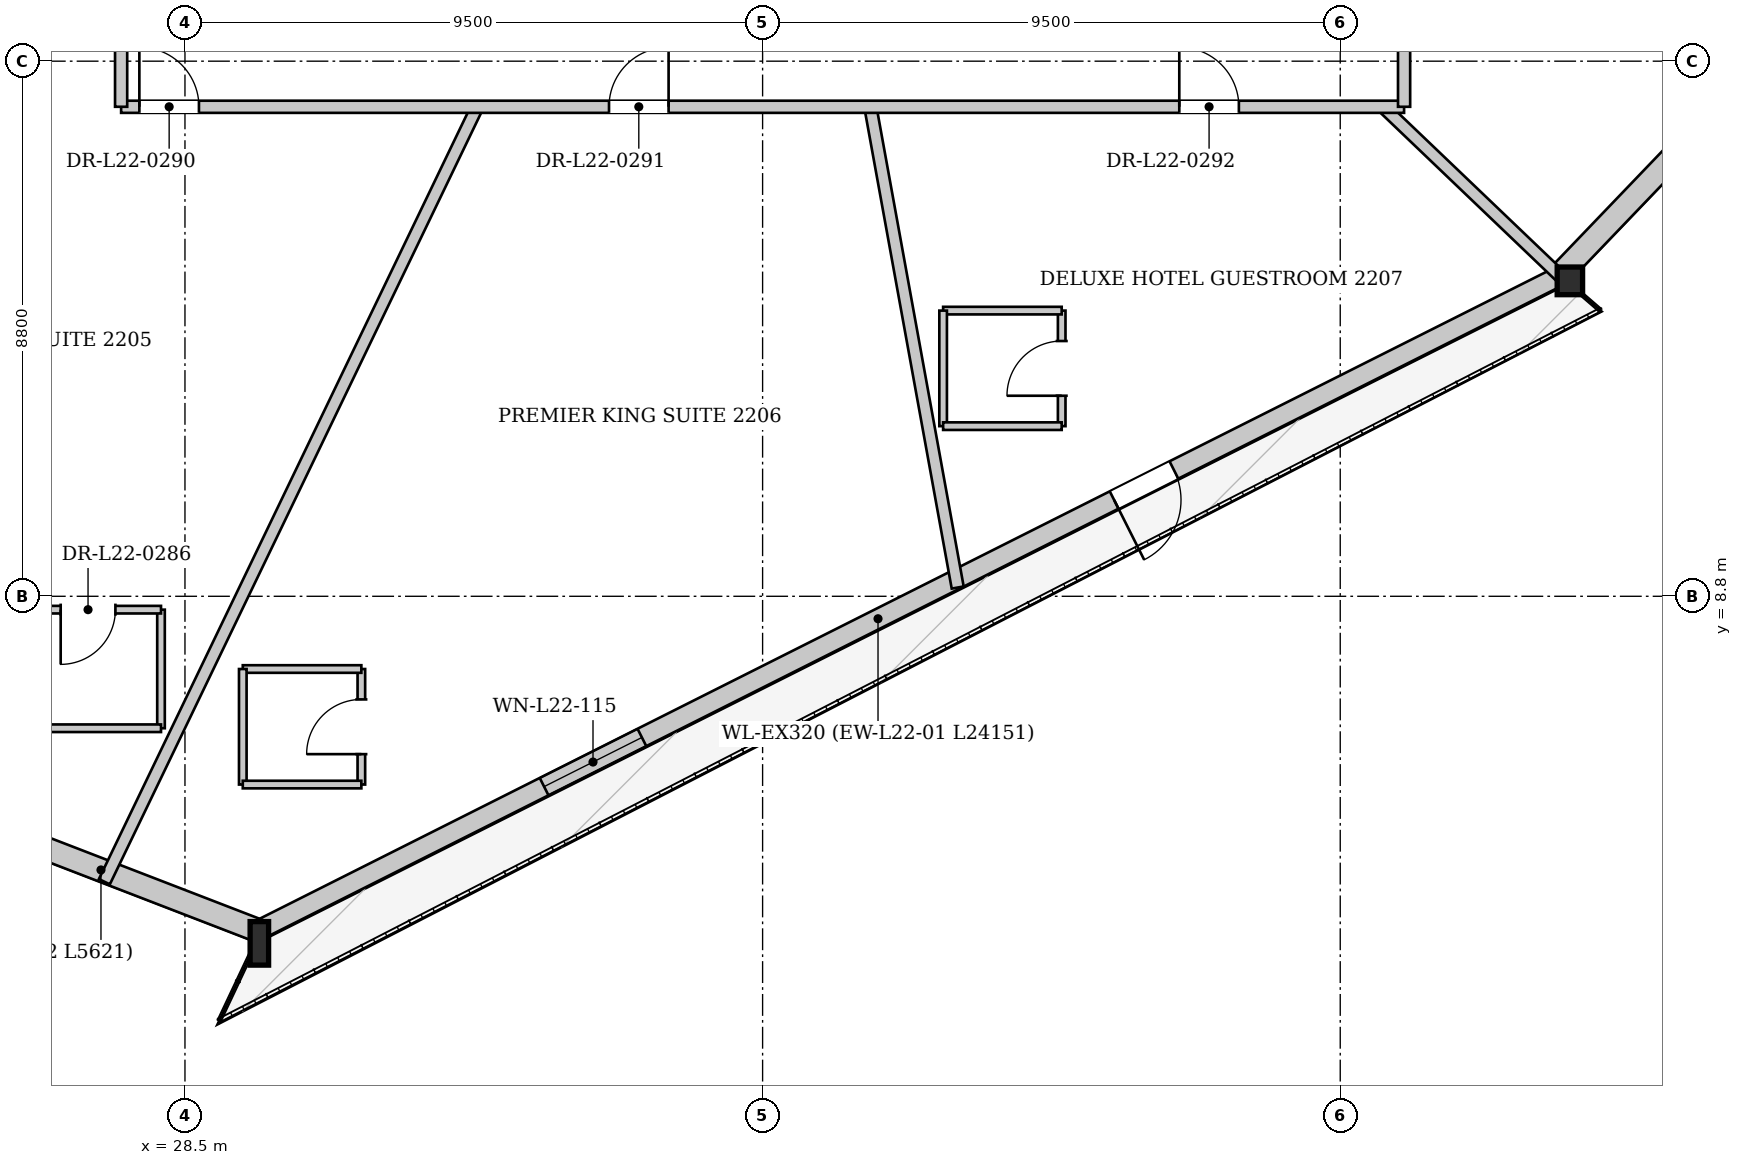
"""IFC4 building model, lengths in metres.
Left out: names, types, materials, properties, quantities, classifications, styles, units other than length and angle.
Written with IfcOpenShell. Run it as: python <this file> out.ifc"""

import sys

from ifc_helpers import new_model, si_unit, direction, frame, frame_2d, origin, origin_2d, place, context, subcontext, project, spatial, rectangle, i_section, extrude, source, transform, mapped, element, fill, save


model = new_model("IFC4")
c1 = context("Model", 3, precision=1e-05, world=origin(), true_north=direction((0.0, 1.0)))
c2 = subcontext(c1, "Body", "Model", "MODEL_VIEW")
j1 = project(units=[si_unit("LENGTHUNIT", "METRE"), si_unit("PLANEANGLEUNIT", "RADIAN")], contexts=[c1])
p1 = place(None, origin())
s1 = spatial("IfcSite", under=j1, at=p1, CompositionType="ELEMENT")
p2 = place(p1, origin())
s2 = spatial("IfcBuilding", under=s1, at=p2, CompositionType="ELEMENT")
p3 = place(p2, frame((0.0, 0.0, 87.95)))
s3 = spatial("IfcBuildingStorey", under=s2, at=p3, CompositionType="ELEMENT", Elevation=87.95)
m1 = source(origin(), c2, "Body", "SweptSolid", [
    extrude(i_section(OverallWidth=0.304, OverallDepth=0.716, WebThickness=0.021, FlangeThickness=0.04, at=origin_2d()), origin(), (0.0, 0.0, 1.0), 3.387),
])
p4 = place(p3, frame((29.672, 3.111, 0.0), z_axis=(0.030348511099, -0.010668835256, 0.999482437979), x_axis=(0.331647716922, 0.943403302867, 0.0)))
e1 = element("IfcColumn", 1, at=p4, inside=s3, PredefinedType="COLUMN", context=c2, shape_type="MappedRepresentation", body=[
    mapped(m1, transform((0.0, 0.0, 0.0), x_axis=(1.0, 0.0, 0.0), y_axis=(0.0, 1.0, 0.0), z_axis=(0.0, 0.0, 1.0), scale=1.0)),
])
m2 = source(origin(), c2, "Body", "SweptSolid", [
    extrude(i_section(OverallWidth=0.418, OverallDepth=0.455, WebThickness=0.038, FlangeThickness=0.059, at=origin_2d()), origin(), (0.0, 0.0, 1.0), 3.386),
])
p5 = place(p3, frame((51.25, 13.958, 0.0), z_axis=(0.016223406344, 0.017088654682, 0.999722350939), x_axis=(-0.72522859459, 0.688508159421, 0.0)))
e2 = element("IfcColumn", 2, at=p5, inside=s3, PredefinedType="COLUMN", context=c2, shape_type="MappedRepresentation", body=[
    mapped(m2, transform((0.0, 0.0, 0.0), x_axis=(1.0, 0.0, 0.0), y_axis=(0.0, 1.0, 0.0), z_axis=(0.0, 0.0, 1.0), scale=1.0)),
])
p6 = place(p3, frame((51.177, 14.101, 0.0), z_axis=(0.0, 0.0, 1.0), x_axis=(-0.893442427341, -0.449177725436, 0.0)))
e3 = element("IfcWall", 3, at=p6, inside=s3, PredefinedType="SOLIDWALL", context=c2, shape_type="SweptSolid", body=[
    extrude(rectangle(XDim=24.151, YDim=0.32, at=frame_2d((12.075, 0.0))), origin(), (0.0, 0.0, 1.0), 2.692),
])
p7 = place(p6, frame((7.178, 0.0, 0.0)))
e4 = element("IfcOpeningElement", 4, at=p7, cuts=e3, PredefinedType="OPENING", context=c2, shape_type="SweptSolid", body=[
    extrude(rectangle(XDim=1.1, YDim=2.3, at=frame_2d((0.55, 1.15))), frame((0.0, 0.17, 0.0), z_axis=(0.0, -1.0, 0.0), x_axis=(1.0, 0.0, 0.0)), (0.0, 0.0, 1.0), 0.34),
])
p8 = place(p6, frame((16.971, 0.0, 0.372)))
e5 = element("IfcOpeningElement", 5, at=p8, cuts=e3, PredefinedType="OPENING", context=c2, shape_type="SweptSolid", body=[
    extrude(rectangle(XDim=1.8, YDim=2.2, at=frame_2d((0.9, 1.1))), frame((0.0, 0.17, 0.0), z_axis=(0.0, -1.0, 0.0), x_axis=(1.0, 0.0, 0.0)), (0.0, 0.0, 1.0), 0.34),
])
p9 = place(p3, frame((29.74, 3.288, 0.0), z_axis=(0.0, 0.0, 1.0), x_axis=(-0.932954356453, 0.359994678816, 0.0)))
e6 = element("IfcWall", 6, at=p9, inside=s3, PredefinedType="SOLIDWALL", context=c2, shape_type="SweptSolid", body=[
    extrude(rectangle(XDim=5.621, YDim=0.38, at=frame_2d((2.811, 0.0))), origin(), (0.0, 0.0, 1.0), 2.692),
])
p10 = place(p3, frame((67.825, 31.523, 0.0), z_axis=(0.0, 0.0, 1.0), x_axis=(-0.692033359157, -0.721865520588, 0.0)))
e7 = element("IfcWall", 7, at=p10, inside=s3, PredefinedType="SOLIDWALL", context=c2, shape_type="SweptSolid", body=[
    extrude(rectangle(XDim=24.15, YDim=0.38, at=frame_2d((12.075, 0.0))), origin(), (0.0, 0.0, 1.0), 2.692),
])
p11 = place(p10, frame((5.662, 0.0, 0.322)))
e8 = element("IfcOpeningElement", 8, at=p11, cuts=e7, PredefinedType="OPENING", context=c2, shape_type="SweptSolid", body=[
    extrude(rectangle(XDim=2.2, YDim=2.25, at=frame_2d((1.1, 1.125))), frame((0.0, 0.2, 0.0), z_axis=(0.0, -1.0, 0.0), x_axis=(1.0, 0.0, 0.0)), (0.0, 0.0, 1.0), 0.4),
])
p12 = place(p10, frame((16.288, 0.0, 0.322)))
e9 = element("IfcOpeningElement", 9, at=p12, cuts=e7, PredefinedType="OPENING", context=c2, shape_type="SweptSolid", body=[
    extrude(rectangle(XDim=2.2, YDim=2.25, at=frame_2d((1.1, 1.125))), frame((0.0, 0.2, 0.0), z_axis=(0.0, -1.0, 0.0), x_axis=(1.0, 0.0, 0.0)), (0.0, 0.0, 1.0), 0.4),
])
p13 = place(p3, frame((27.45, 20.919, 0.0), z_axis=(0.0, 0.0, 1.0), x_axis=(-0.880473647021, -0.474095092678, 0.0)))
e10 = element("IfcWall", 10, at=p13, inside=s3, PredefinedType="PARTITIONING", context=c2, shape_type="SweptSolid", body=[
    extrude(rectangle(XDim=9.233, YDim=0.2, at=frame_2d((4.617, 0.0))), origin(), (0.0, 0.0, 1.0), 3.3),
])
p14 = place(p3, frame((33.308, 16.85, 0.0), z_axis=(0.0, 0.0, 1.0), x_axis=(-0.433656268432, -0.901078376641, 0.0)))
e11 = element("IfcWall", 11, at=p14, inside=s3, PredefinedType="PARTITIONING", context=c2, shape_type="SweptSolid", body=[
    extrude(rectangle(XDim=14.143, YDim=0.2, at=frame_2d((7.071, 0.0))), origin(), (0.0, 0.0, 1.0), 3.3),
])
p15 = place(p3, frame((39.772, 16.85, 0.0), z_axis=(0.0, 0.0, 1.0), x_axis=(0.178773141737, -0.983890321018, 0.0)))
e12 = element("IfcWall", 12, at=p15, inside=s3, PredefinedType="PARTITIONING", context=c2, shape_type="SweptSolid", body=[
    extrude(rectangle(XDim=8.035, YDim=0.2, at=frame_2d((4.018, 0.0))), origin(), (0.0, 0.0, 1.0), 3.3),
])
p16 = place(p3, frame((48.203, 16.85, 0.0), z_axis=(0.0, 0.0, 1.0), x_axis=(0.722962702981, -0.690887060306, 0.0)))
e13 = element("IfcWall", 13, at=p16, inside=s3, PredefinedType="PARTITIONING", context=c2, shape_type="SweptSolid", body=[
    extrude(rectangle(XDim=4.163, YDim=0.2, at=frame_2d((2.082, 0.0))), origin(), (0.0, 0.0, 1.0), 2.785),
])
p17 = place(p3, frame((28.106, 6.63, 0.0), z_axis=(0.0, 0.0, 1.0), x_axis=(0.0, 1.0, 0.0)))
e14 = element("IfcWall", 14, at=p17, inside=s3, PredefinedType="PARTITIONING", context=c2, shape_type="SweptSolid", body=[
    extrude(rectangle(XDim=1.95, YDim=0.125, at=frame_2d((0.975, 0.0))), origin(), (0.0, 0.0, 1.0), 3.3),
])
p18 = place(p3, frame((28.106, 8.58, 0.0), z_axis=(0.0, 0.0, 1.0), x_axis=(-1.0, 0.0, 0.0)))
e15 = element("IfcWall", 15, at=p18, inside=s3, PredefinedType="PARTITIONING", context=c2, shape_type="SweptSolid", body=[
    extrude(rectangle(XDim=2.4, YDim=0.125, at=frame_2d((1.2, 0.0))), origin(), (0.0, 0.0, 1.0), 3.3),
])
p19 = place(p18, frame((0.75, 0.0, 0.0)))
e16 = element("IfcOpeningElement", 16, at=p19, cuts=e15, PredefinedType="OPENING", context=c2, shape_type="SweptSolid", body=[
    extrude(rectangle(XDim=0.9, YDim=2.1, at=frame_2d((0.45, 1.05))), frame((0.0, 0.073, 0.0), z_axis=(0.0, -1.0, 0.0), x_axis=(1.0, 0.0, 0.0)), (0.0, 0.0, 1.0), 0.145),
])
p20 = place(p3, frame((25.706, 6.63, 0.0), z_axis=(0.0, 0.0, 1.0), x_axis=(1.0, 0.0, 0.0)))
e17 = element("IfcWall", 17, at=p20, inside=s3, PredefinedType="PARTITIONING", context=c2, shape_type="SweptSolid", body=[
    extrude(rectangle(XDim=2.4, YDim=0.125, at=frame_2d((1.2, 0.0))), origin(), (0.0, 0.0, 1.0), 3.3),
])
p21 = place(p3, frame((31.401, 5.704, 0.0), z_axis=(0.0, 0.0, 1.0), x_axis=(0.0, 1.0, 0.0)))
e18 = element("IfcWall", 18, at=p21, inside=s3, PredefinedType="PARTITIONING", context=c2, shape_type="SweptSolid", body=[
    extrude(rectangle(XDim=1.9, YDim=0.125, at=frame_2d((0.95, 0.0))), origin(), (0.0, 0.0, 1.0), 2.795),
])
p22 = place(p21, frame((0.5, 0.0, 0.0)))
e19 = element("IfcOpeningElement", 19, at=p22, cuts=e18, PredefinedType="OPENING", context=c2, shape_type="SweptSolid", body=[
    extrude(rectangle(XDim=0.9, YDim=2.1, at=frame_2d((0.45, 1.05))), frame((0.0, 0.073, 0.0), z_axis=(0.0, -1.0, 0.0), x_axis=(1.0, 0.0, 0.0)), (0.0, 0.0, 1.0), 0.145),
])
p23 = place(p3, frame((31.401, 7.604, 0.0), z_axis=(0.0, 0.0, 1.0), x_axis=(-1.0, 0.0, 0.0)))
e20 = element("IfcWall", 20, at=p23, inside=s3, PredefinedType="PARTITIONING", context=c2, shape_type="SweptSolid", body=[
    extrude(rectangle(XDim=1.95, YDim=0.125, at=frame_2d((0.975, 0.0))), origin(), (0.0, 0.0, 1.0), 3.3),
])
p24 = place(p3, frame((29.451, 7.604, 0.0), z_axis=(0.0, 0.0, 1.0), x_axis=(0.0, -1.0, 0.0)))
e21 = element("IfcWall", 21, at=p24, inside=s3, PredefinedType="PARTITIONING", context=c2, shape_type="SweptSolid", body=[
    extrude(rectangle(XDim=1.9, YDim=0.125, at=frame_2d((0.95, 0.0))), origin(), (0.0, 0.0, 1.0), 3.3),
])
p25 = place(p3, frame((29.451, 5.704, 0.0), z_axis=(0.0, 0.0, 1.0), x_axis=(1.0, 0.0, 0.0)))
e22 = element("IfcWall", 22, at=p25, inside=s3, PredefinedType="PARTITIONING", context=c2, shape_type="SweptSolid", body=[
    extrude(rectangle(XDim=1.95, YDim=0.125, at=frame_2d((0.975, 0.0))), origin(), (0.0, 0.0, 1.0), 3.3),
])
p26 = place(p3, frame((42.919, 11.598, 0.0), z_axis=(0.0, 0.0, 1.0), x_axis=(0.0, 1.0, 0.0)))
e23 = element("IfcWall", 23, at=p26, inside=s3, PredefinedType="PARTITIONING", context=c2, shape_type="SweptSolid", body=[
    extrude(rectangle(XDim=1.9, YDim=0.125, at=frame_2d((0.95, 0.0))), origin(), (0.0, 0.0, 1.0), 3.3),
])
p27 = place(p26, frame((0.5, 0.0, 0.0)))
e24 = element("IfcOpeningElement", 24, at=p27, cuts=e23, PredefinedType="OPENING", context=c2, shape_type="SweptSolid", body=[
    extrude(rectangle(XDim=0.9, YDim=2.1, at=frame_2d((0.45, 1.05))), frame((0.0, 0.073, 0.0), z_axis=(0.0, -1.0, 0.0), x_axis=(1.0, 0.0, 0.0)), (0.0, 0.0, 1.0), 0.145),
])
p28 = place(p3, frame((42.919, 13.498, 0.0), z_axis=(0.0, 0.0, 1.0), x_axis=(-1.0, 0.0, 0.0)))
e25 = element("IfcWall", 25, at=p28, inside=s3, PredefinedType="PARTITIONING", context=c2, shape_type="SweptSolid", body=[
    extrude(rectangle(XDim=1.95, YDim=0.125, at=frame_2d((0.975, 0.0))), origin(), (0.0, 0.0, 1.0), 2.925),
])
p29 = place(p3, frame((40.969, 13.498, 0.0), z_axis=(0.0, 0.0, 1.0), x_axis=(0.0, -1.0, 0.0)))
e26 = element("IfcWall", 26, at=p29, inside=s3, PredefinedType="PARTITIONING", context=c2, shape_type="SweptSolid", body=[
    extrude(rectangle(XDim=1.9, YDim=0.125, at=frame_2d((0.95, 0.0))), origin(), (0.0, 0.0, 1.0), 3.3),
])
p30 = place(p3, frame((40.969, 11.598, 0.0), z_axis=(0.0, 0.0, 1.0), x_axis=(1.0, 0.0, 0.0)))
e27 = element("IfcWall", 27, at=p30, inside=s3, PredefinedType="PARTITIONING", context=c2, shape_type="SweptSolid", body=[
    extrude(rectangle(XDim=1.95, YDim=0.125, at=frame_2d((0.975, 0.0))), origin(), (0.0, 0.0, 1.0), 3.3),
])
p31 = place(p3, frame((27.45, 16.85, 0.0), z_axis=(0.0, 0.0, 1.0), x_axis=(1.0, 0.0, 0.0)))
e28 = element("IfcWall", 28, at=p31, inside=s3, PredefinedType="PARTITIONING", context=c2, shape_type="SweptSolid", body=[
    extrude(rectangle(XDim=21.1, YDim=0.2, at=frame_2d((10.55, 0.0))), origin(), (0.0, 0.0, 1.0), 3.3),
])
p32 = place(p31, frame((0.3, 0.0, 0.0)))
e29 = element("IfcOpeningElement", 29, at=p32, cuts=e28, PredefinedType="OPENING", context=c2, shape_type="SweptSolid", body=[
    extrude(rectangle(XDim=0.98, YDim=2.15, at=frame_2d((0.49, 1.075))), frame((0.0, 0.11, 0.0), z_axis=(0.0, -1.0, 0.0), x_axis=(1.0, 0.0, 0.0)), (0.0, 0.0, 1.0), 0.22),
])
p33 = place(p31, frame((8.024, 0.0, 0.0)))
e30 = element("IfcOpeningElement", 30, at=p33, cuts=e28, PredefinedType="OPENING", context=c2, shape_type="SweptSolid", body=[
    extrude(rectangle(XDim=0.98, YDim=2.15, at=frame_2d((0.49, 1.075))), frame((0.0, 0.11, 0.0), z_axis=(0.0, -1.0, 0.0), x_axis=(1.0, 0.0, 0.0)), (0.0, 0.0, 1.0), 0.22),
])
p34 = place(p31, frame((17.403, 0.0, 0.0)))
e31 = element("IfcOpeningElement", 31, at=p34, cuts=e28, PredefinedType="OPENING", context=c2, shape_type="SweptSolid", body=[
    extrude(rectangle(XDim=0.98, YDim=2.15, at=frame_2d((0.49, 1.075))), frame((0.0, 0.11, 0.0), z_axis=(0.0, -1.0, 0.0), x_axis=(1.0, 0.0, 0.0)), (0.0, 0.0, 1.0), 0.22),
])
p35 = place(p3, frame((27.45, 16.85, 0.0), z_axis=(0.0, 0.0, 1.0), x_axis=(0.0, 1.0, 0.0)))
e32 = element("IfcWall", 32, at=p35, inside=s3, PredefinedType="PARTITIONING", context=c2, shape_type="SweptSolid", body=[
    extrude(rectangle(XDim=19.5, YDim=0.2, at=frame_2d((9.75, 0.0))), origin(), (0.0, 0.0, 1.0), 3.3),
])
p36 = place(p35, frame((15.525, 0.0, 0.0)))
e33 = element("IfcOpeningElement", 33, at=p36, cuts=e32, PredefinedType="OPENING", context=c2, shape_type="SweptSolid", body=[
    extrude(rectangle(XDim=0.98, YDim=2.15, at=frame_2d((0.49, 1.075))), frame((0.0, 0.11, 0.0), z_axis=(0.0, -1.0, 0.0), x_axis=(1.0, 0.0, 0.0)), (0.0, 0.0, 1.0), 0.22),
])
p37 = place(p35, frame((6.543, 0.0, 0.0)))
e34 = element("IfcOpeningElement", 34, at=p37, cuts=e32, PredefinedType="OPENING", context=c2, shape_type="SweptSolid", body=[
    extrude(rectangle(XDim=0.98, YDim=2.15, at=frame_2d((0.49, 1.075))), frame((0.0, 0.11, 0.0), z_axis=(0.0, -1.0, 0.0), x_axis=(1.0, 0.0, 0.0)), (0.0, 0.0, 1.0), 0.22),
])
p38 = place(p3, frame((48.55, 16.85, 0.0), z_axis=(0.0, 0.0, 1.0), x_axis=(0.0, 1.0, 0.0)))
e35 = element("IfcWall", 35, at=p38, inside=s3, PredefinedType="PARTITIONING", context=c2, shape_type="SweptSolid", body=[
    extrude(rectangle(XDim=19.5, YDim=0.2, at=frame_2d((9.75, 0.0))), origin(), (0.0, 0.0, 1.0), 3.3),
])
p39 = place(p38, frame((3.251, 0.0, 0.0)))
e36 = element("IfcOpeningElement", 36, at=p39, cuts=e35, PredefinedType="OPENING", context=c2, shape_type="SweptSolid", body=[
    extrude(rectangle(XDim=0.98, YDim=2.15, at=frame_2d((0.49, 1.075))), frame((0.0, 0.11, 0.0), z_axis=(0.0, -1.0, 0.0), x_axis=(1.0, 0.0, 0.0)), (0.0, 0.0, 1.0), 0.22),
])
p40 = place(p38, frame((11.176, 0.0, 0.0)))
e37 = element("IfcOpeningElement", 37, at=p40, cuts=e35, PredefinedType="OPENING", context=c2, shape_type="SweptSolid", body=[
    extrude(rectangle(XDim=0.98, YDim=2.15, at=frame_2d((0.49, 1.075))), frame((0.0, 0.11, 0.0), z_axis=(0.0, -1.0, 0.0), x_axis=(1.0, 0.0, 0.0)), (0.0, 0.0, 1.0), 0.22),
])
m3 = source(origin(), c2, "Body", "SweptSolid", [
    extrude(rectangle(XDim=1.1, YDim=2.3, at=frame_2d((0.55, 1.15))), frame((0.0, 0.025, 0.0), z_axis=(0.0, -1.0, 0.0), x_axis=(1.0, 0.0, 0.0)), (0.0, 0.0, 1.0), 0.05),
])
p41 = place(p7, origin())
e38 = element("IfcDoor", 38, at=p41, inside=s3, OperationType="SINGLE_SWING_RIGHT", PredefinedType="DOOR", context=c2, shape_type="MappedRepresentation", body=[
    mapped(m3, transform((0.0, 0.0, 0.0), x_axis=(1.0, 0.0, 0.0), y_axis=(0.0, 1.0, 0.0), z_axis=(0.0, 0.0, 1.0), scale=1.0)),
])
fill(e4, e38)
m4 = source(origin(), c2, "Body", "SweptSolid", [
    extrude(rectangle(XDim=1.8, YDim=2.2, at=frame_2d((0.9, 1.1))), frame((0.0, 0.03, 0.0), z_axis=(0.0, -1.0, 0.0), x_axis=(1.0, 0.0, 0.0)), (0.0, 0.0, 1.0), 0.06),
])
p42 = place(p8, origin())
e39 = element("IfcWindow", 39, at=p42, inside=s3, PartitioningType="SINGLE_PANEL", PredefinedType="WINDOW", context=c2, shape_type="MappedRepresentation", body=[
    mapped(m4, transform((0.0, 0.0, 0.0), x_axis=(1.0, 0.0, 0.0), y_axis=(0.0, 1.0, 0.0), z_axis=(0.0, 0.0, 1.0), scale=1.0)),
])
fill(e5, e39)
m5 = source(origin(), c2, "Body", "SweptSolid", [
    extrude(rectangle(XDim=0.9, YDim=2.1, at=frame_2d((0.45, 1.05))), frame((0.0, 0.025, 0.0), z_axis=(0.0, -1.0, 0.0), x_axis=(1.0, 0.0, 0.0)), (0.0, 0.0, 1.0), 0.05),
])
p43 = place(p19, origin())
e40 = element("IfcDoor", 40, at=p43, inside=s3, OperationType="SINGLE_SWING_RIGHT", PredefinedType="DOOR", context=c2, shape_type="MappedRepresentation", body=[
    mapped(m5, transform((0.0, 0.0, 0.0), x_axis=(1.0, 0.0, 0.0), y_axis=(0.0, 1.0, 0.0), z_axis=(0.0, 0.0, 1.0), scale=1.0)),
])
fill(e16, e40)
p44 = place(p22, origin())
e41 = element("IfcDoor", 41, at=p44, inside=s3, OperationType="SINGLE_SWING_LEFT", PredefinedType="DOOR", context=c2, shape_type="MappedRepresentation", body=[
    mapped(m5, transform((0.0, 0.0, 0.0), x_axis=(1.0, 0.0, 0.0), y_axis=(0.0, 1.0, 0.0), z_axis=(0.0, 0.0, 1.0), scale=1.0)),
])
fill(e19, e41)
p45 = place(p27, origin())
e42 = element("IfcDoor", 42, at=p45, inside=s3, OperationType="SINGLE_SWING_LEFT", PredefinedType="DOOR", context=c2, shape_type="MappedRepresentation", body=[
    mapped(m5, transform((0.0, 0.0, 0.0), x_axis=(1.0, 0.0, 0.0), y_axis=(0.0, 1.0, 0.0), z_axis=(0.0, 0.0, 1.0), scale=1.0)),
])
fill(e24, e42)
m6 = source(origin(), c2, "Body", "SweptSolid", [
    extrude(rectangle(XDim=0.98, YDim=2.15, at=frame_2d((0.49, 1.075))), frame((0.0, 0.025, 0.0), z_axis=(0.0, -1.0, 0.0), x_axis=(1.0, 0.0, 0.0)), (0.0, 0.0, 1.0), 0.05),
])
p46 = place(p32, origin())
e43 = element("IfcDoor", 43, at=p46, inside=s3, OperationType="SINGLE_SWING_LEFT", PredefinedType="DOOR", context=c2, shape_type="MappedRepresentation", body=[
    mapped(m6, transform((0.0, 0.0, 0.0), x_axis=(1.0, 0.0, 0.0), y_axis=(0.0, 1.0, 0.0), z_axis=(0.0, 0.0, 1.0), scale=1.0)),
])
fill(e29, e43)
p47 = place(p33, origin())
e44 = element("IfcDoor", 44, at=p47, inside=s3, OperationType="SINGLE_SWING_RIGHT", PredefinedType="DOOR", context=c2, shape_type="MappedRepresentation", body=[
    mapped(m6, transform((0.0, 0.0, 0.0), x_axis=(1.0, 0.0, 0.0), y_axis=(0.0, 1.0, 0.0), z_axis=(0.0, 0.0, 1.0), scale=1.0)),
])
fill(e30, e44)
p48 = place(p34, origin())
e45 = element("IfcDoor", 45, at=p48, inside=s3, OperationType="SINGLE_SWING_LEFT", PredefinedType="DOOR", context=c2, shape_type="MappedRepresentation", body=[
    mapped(m6, transform((0.0, 0.0, 0.0), x_axis=(1.0, 0.0, 0.0), y_axis=(0.0, 1.0, 0.0), z_axis=(0.0, 0.0, 1.0), scale=1.0)),
])
fill(e31, e45)
save(model, sys.argv[1])
